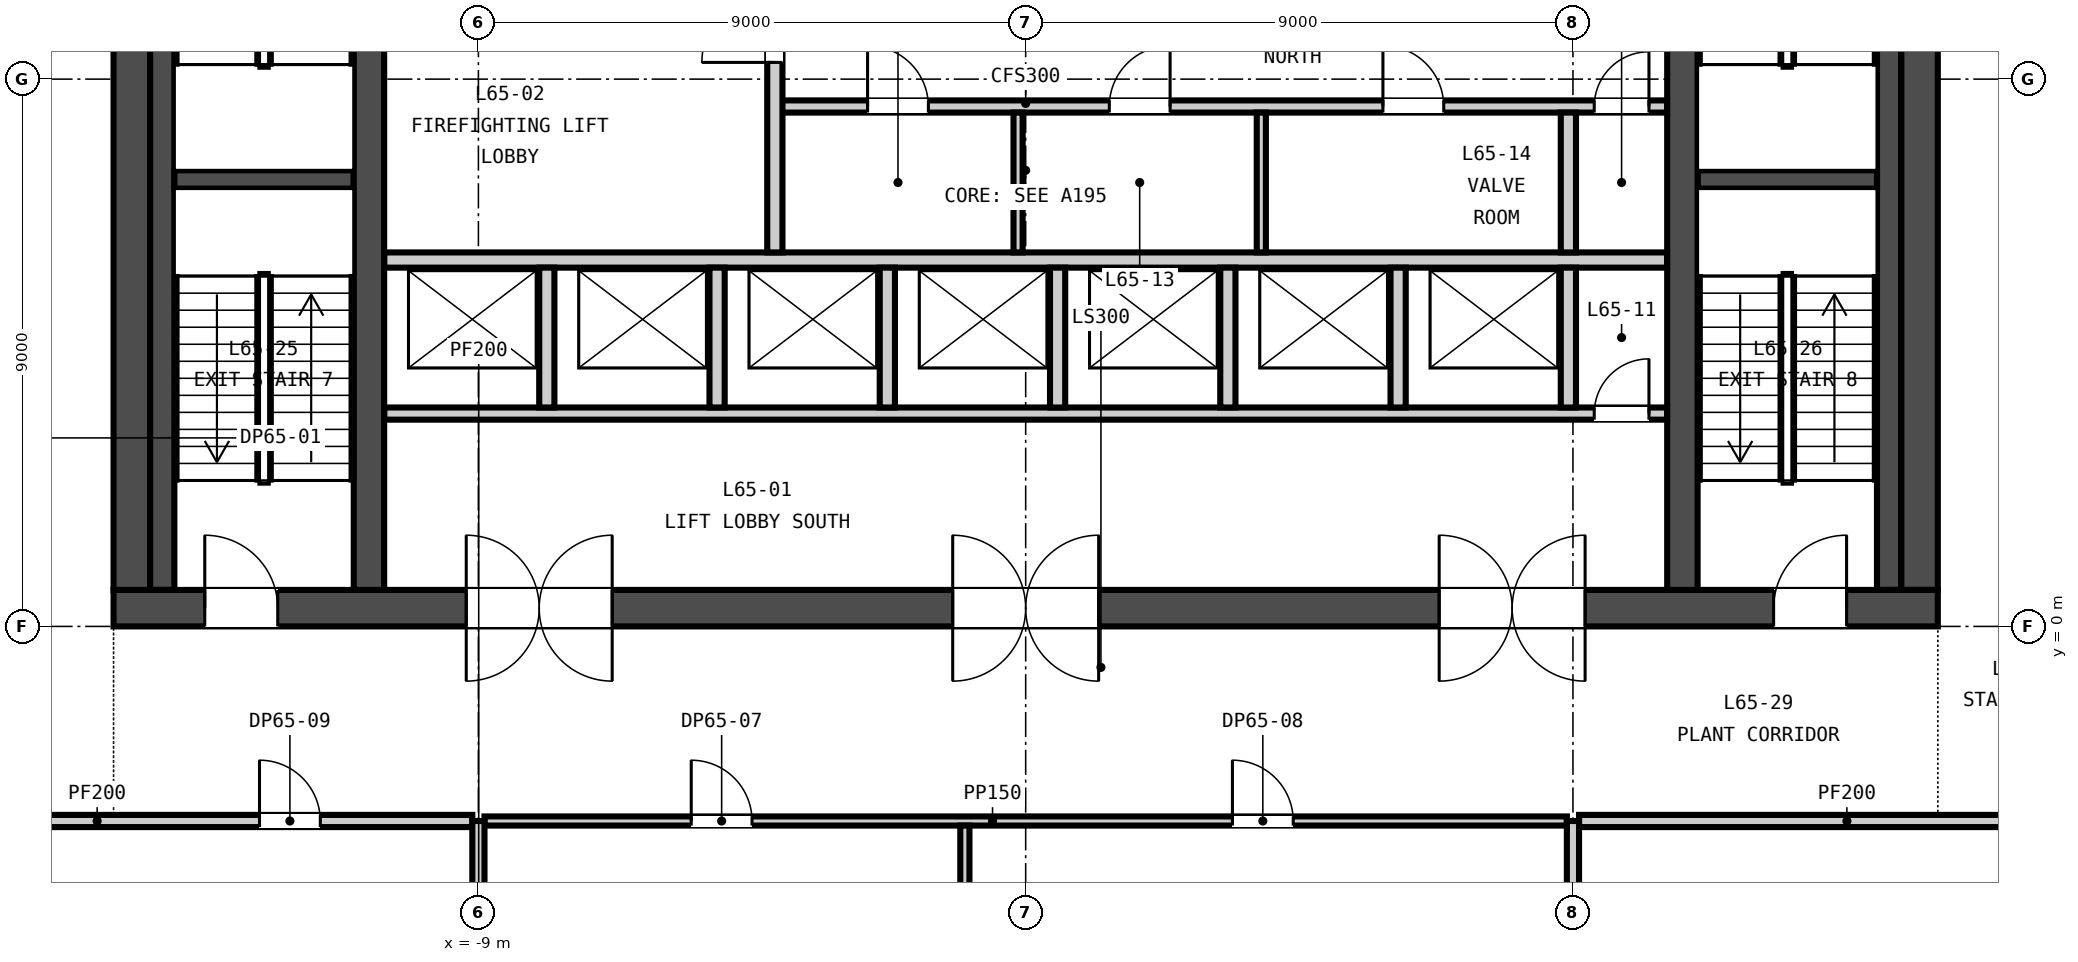
"""IFC4 building model, lengths in metres.
Left out: names, types, materials, properties, quantities, classifications, styles, units other than length and angle.
Written with IfcOpenShell. Run it as: python <this file> out.ifc"""

import sys

from ifc_helpers import new_model, si_unit, direction, frame, frame_2d, origin, place, context, subcontext, project, spatial, rectangle, extrude, element, fill, save


model = new_model("IFC4")
c1 = context("Model", 3, precision=1e-05, world=origin(), true_north=direction((0.0, 1.0)))
c2 = subcontext(c1, "Body", "Model", "MODEL_VIEW")
j1 = project(units=[si_unit("LENGTHUNIT", "METRE"), si_unit("PLANEANGLEUNIT", "RADIAN")], contexts=[c1])
p1 = place(None, origin())
s1 = spatial("IfcSite", under=j1, at=p1, CompositionType="ELEMENT")
p2 = place(p1, origin())
s2 = spatial("IfcBuilding", under=s1, at=p2, CompositionType="ELEMENT")
p3 = place(p2, frame((0.0, 0.0, 256.45)))
s3 = spatial("IfcBuildingStorey", under=s2, at=p3, CompositionType="ELEMENT", Elevation=256.45)
p4 = place(p3, frame((-15.0, 0.3, -0.3), z_axis=(0.0, 0.0, 1.0), x_axis=(1.0, 0.0, 0.0)))
e1 = element("IfcWall", 1, at=p4, inside=s3, PredefinedType="SOLIDWALL", context=c2, shape_type="SweptSolid", body=[
    extrude(rectangle(XDim=30.0, YDim=0.6, at=frame_2d((15.0, 0.0))), origin(), (0.0, 0.0, 1.0), 4.65),
])
p5 = place(p4, frame((5.8, 0.0, 0.3)))
e2 = element("IfcOpeningElement", 2, at=p5, cuts=e1, PredefinedType="OPENING", context=c2, shape_type="SweptSolid", body=[
    extrude(rectangle(XDim=2.4, YDim=2.4, at=frame_2d((1.2, 1.2))), frame((0.0, 0.31, 0.0), z_axis=(0.0, -1.0, 0.0), x_axis=(1.0, 0.0, 0.0)), (0.0, 0.0, 1.0), 0.62),
])
p6 = place(p4, frame((13.8, 0.0, 0.3)))
e3 = element("IfcOpeningElement", 3, at=p6, cuts=e1, PredefinedType="OPENING", context=c2, shape_type="SweptSolid", body=[
    extrude(rectangle(XDim=2.4, YDim=2.4, at=frame_2d((1.2, 1.2))), frame((0.0, 0.31, 0.0), z_axis=(0.0, -1.0, 0.0), x_axis=(1.0, 0.0, 0.0)), (0.0, 0.0, 1.0), 0.62),
])
p7 = place(p4, frame((21.8, 0.0, 0.3)))
e4 = element("IfcOpeningElement", 4, at=p7, cuts=e1, PredefinedType="OPENING", context=c2, shape_type="SweptSolid", body=[
    extrude(rectangle(XDim=2.4, YDim=2.4, at=frame_2d((1.2, 1.2))), frame((0.0, 0.31, 0.0), z_axis=(0.0, -1.0, 0.0), x_axis=(1.0, 0.0, 0.0)), (0.0, 0.0, 1.0), 0.62),
])
p8 = place(p4, frame((1.5, 0.0, 0.3)))
e5 = element("IfcOpeningElement", 5, at=p8, cuts=e1, PredefinedType="OPENING", context=c2, shape_type="SweptSolid", body=[
    extrude(rectangle(XDim=1.2, YDim=2.1, at=frame_2d((0.6, 1.05))), frame((0.0, 0.31, 0.0), z_axis=(0.0, -1.0, 0.0), x_axis=(1.0, 0.0, 0.0)), (0.0, 0.0, 1.0), 0.62),
])
p9 = place(p4, frame((27.3, 0.0, 0.3)))
e6 = element("IfcOpeningElement", 6, at=p9, cuts=e1, PredefinedType="OPENING", context=c2, shape_type="SweptSolid", body=[
    extrude(rectangle(XDim=1.2, YDim=2.1, at=frame_2d((0.6, 1.05))), frame((0.0, 0.31, 0.0), z_axis=(0.0, -1.0, 0.0), x_axis=(1.0, 0.0, 0.0)), (0.0, 0.0, 1.0), 0.62),
])
for number, where, z_axis, x_axis in (
    (7, (-14.7, 0.6, -0.3), (0.0, 0.0, 1.0), (0.0, 1.0, 0.0)),
    (8, (14.7, 0.6, -0.3), (0.0, 0.0, 1.0), (0.0, 1.0, 0.0)),
):
    element("IfcWall", number, at=place(p3, frame(where, z_axis=z_axis, x_axis=x_axis)), inside=s3, PredefinedType="SOLIDWALL", context=c2, shape_type="SweptSolid", body=[
        extrude(rectangle(XDim=13.8, YDim=0.6, at=frame_2d((6.9, 0.0))), origin(), (0.0, 0.0, 1.0), 4.65),
    ])
for number, where, z_axis, x_axis in (
    (9, (-10.8, 0.6, -0.3), (0.0, 0.0, 1.0), (0.0, 1.0, 0.0)),
    (10, (10.8, 0.6, -0.3), (0.0, 0.0, 1.0), (0.0, 1.0, 0.0)),
):
    element("IfcWall", number, at=place(p3, frame(where, z_axis=z_axis, x_axis=x_axis)), inside=s3, PredefinedType="SOLIDWALL", context=c2, shape_type="SweptSolid", body=[
        extrude(rectangle(XDim=13.8, YDim=0.5, at=frame_2d((6.9, 0.0))), origin(), (0.0, 0.0, 1.0), 4.65),
    ])
p10 = place(p3, frame((-10.55, 3.5, 0.0), z_axis=(0.0, 0.0, 1.0), x_axis=(1.0, 0.0, 0.0)))
e11 = element("IfcWall", 11, at=p10, inside=s3, PredefinedType="PARTITIONING", context=c2, shape_type="SweptSolid", body=[
    extrude(rectangle(XDim=21.1, YDim=0.2, at=frame_2d((10.55, 0.0))), origin(), (0.0, 0.0, 1.0), 4.35),
])
p11 = place(p10, frame((19.9, 0.0, 0.0)))
e12 = element("IfcOpeningElement", 12, at=p11, cuts=e11, PredefinedType="OPENING", context=c2, shape_type="SweptSolid", body=[
    extrude(rectangle(XDim=0.9, YDim=2.1, at=frame_2d((0.45, 1.05))), frame((0.0, 0.11, 0.0), z_axis=(0.0, -1.0, 0.0), x_axis=(1.0, 0.0, 0.0)), (0.0, 0.0, 1.0), 0.22),
])
p12 = place(p3, frame((-10.55, 6.025, 0.0), z_axis=(0.0, 0.0, 1.0), x_axis=(1.0, 0.0, 0.0)))
e13 = element("IfcWall", 13, at=p12, inside=s3, PredefinedType="PARTITIONING", context=c2, shape_type="SweptSolid", body=[
    extrude(rectangle(XDim=21.1, YDim=0.25, at=frame_2d((10.55, 0.0))), origin(), (0.0, 0.0, 1.0), 4.35),
])
p13 = place(p3, frame((-4.125, 8.55, 0.0), z_axis=(0.0, 0.0, 1.0), x_axis=(1.0, 0.0, 0.0)))
e14 = element("IfcWall", 14, at=p13, inside=s3, PredefinedType="PARTITIONING", context=c2, shape_type="SweptSolid", body=[
    extrude(rectangle(XDim=14.675, YDim=0.2, at=frame_2d((7.337, 0.0))), origin(), (0.0, 0.0, 1.0), 4.35),
])
p14 = place(p13, frame((1.525, 0.0, 0.0)))
e15 = element("IfcOpeningElement", 15, at=p14, cuts=e14, PredefinedType="OPENING", context=c2, shape_type="SweptSolid", body=[
    extrude(rectangle(XDim=1.0, YDim=2.1, at=frame_2d((0.5, 1.05))), frame((0.0, 0.11, 0.0), z_axis=(0.0, -1.0, 0.0), x_axis=(1.0, 0.0, 0.0)), (0.0, 0.0, 1.0), 0.22),
])
p15 = place(p13, frame((5.5, 0.0, 0.0)))
e16 = element("IfcOpeningElement", 16, at=p15, cuts=e14, PredefinedType="OPENING", context=c2, shape_type="SweptSolid", body=[
    extrude(rectangle(XDim=1.0, YDim=2.1, at=frame_2d((0.5, 1.05))), frame((0.0, 0.11, 0.0), z_axis=(0.0, -1.0, 0.0), x_axis=(1.0, 0.0, 0.0)), (0.0, 0.0, 1.0), 0.22),
])
p16 = place(p13, frame((10.0, 0.0, 0.0)))
e17 = element("IfcOpeningElement", 17, at=p16, cuts=e14, PredefinedType="OPENING", context=c2, shape_type="SweptSolid", body=[
    extrude(rectangle(XDim=1.0, YDim=2.1, at=frame_2d((0.5, 1.05))), frame((0.0, 0.11, 0.0), z_axis=(0.0, -1.0, 0.0), x_axis=(1.0, 0.0, 0.0)), (0.0, 0.0, 1.0), 0.22),
])
p17 = place(p13, frame((13.475, 0.0, 0.0)))
e18 = element("IfcOpeningElement", 18, at=p17, cuts=e14, PredefinedType="OPENING", context=c2, shape_type="SweptSolid", body=[
    extrude(rectangle(XDim=0.9, YDim=2.1, at=frame_2d((0.45, 1.05))), frame((0.0, 0.11, 0.0), z_axis=(0.0, -1.0, 0.0), x_axis=(1.0, 0.0, 0.0)), (0.0, 0.0, 1.0), 0.22),
])
p18 = place(p3, frame((-4.125, 6.15, 0.0), z_axis=(0.0, 0.0, 1.0), x_axis=(0.0, 1.0, 0.0)))
e19 = element("IfcWall", 19, at=p18, inside=s3, PredefinedType="PARTITIONING", context=c2, shape_type="SweptSolid", body=[
    extrude(rectangle(XDim=4.95, YDim=0.25, at=frame_2d((2.475, 0.0))), origin(), (0.0, 0.0, 1.0), 4.35),
])
p19 = place(p18, frame((3.125, 0.0, 0.0)))
e20 = element("IfcOpeningElement", 20, at=p19, cuts=e19, PredefinedType="OPENING", context=c2, shape_type="SweptSolid", body=[
    extrude(rectangle(XDim=1.2, YDim=2.1, at=frame_2d((0.6, 1.05))), frame((0.0, 0.135, 0.0), z_axis=(0.0, -1.0, 0.0), x_axis=(1.0, 0.0, 0.0)), (0.0, 0.0, 1.0), 0.27),
])
for number, where, z_axis, x_axis in (
    (21, (-7.875, 3.6, 0.0), (0.0, 0.0, 1.0), (0.0, 1.0, 0.0)),
    (22, (-5.075, 3.6, 0.0), (0.0, 0.0, 1.0), (0.0, 1.0, 0.0)),
    (23, (-2.275, 3.6, 0.0), (0.0, 0.0, 1.0), (0.0, 1.0, 0.0)),
    (24, (0.525, 3.6, 0.0), (0.0, 0.0, 1.0), (0.0, 1.0, 0.0)),
    (25, (3.325, 3.6, 0.0), (0.0, 0.0, 1.0), (0.0, 1.0, 0.0)),
    (26, (6.125, 3.6, 0.0), (0.0, 0.0, 1.0), (0.0, 1.0, 0.0)),
    (27, (8.925, 3.6, 0.0), (0.0, 0.0, 1.0), (0.0, 1.0, 0.0)),
):
    element("IfcWall", number, at=place(p3, frame(where, z_axis=z_axis, x_axis=x_axis)), inside=s3, PredefinedType="PARTITIONING", context=c2, shape_type="SweptSolid", body=[
        extrude(rectangle(XDim=2.3, YDim=0.25, at=frame_2d((1.15, 0.0))), origin(), (0.0, 0.0, 1.0), 4.35),
    ])
for number, where, z_axis, x_axis in (
    (28, (-0.125, 6.15, 0.0), (0.0, 0.0, 1.0), (0.0, 1.0, 0.0)),
    (29, (3.875, 6.15, 0.0), (0.0, 0.0, 1.0), (0.0, 1.0, 0.0)),
):
    element("IfcWall", number, at=place(p3, frame(where, z_axis=z_axis, x_axis=x_axis)), inside=s3, PredefinedType="PARTITIONING", context=c2, shape_type="SweptSolid", body=[
        extrude(rectangle(XDim=2.3, YDim=0.15, at=frame_2d((1.15, 0.0))), origin(), (0.0, 0.0, 1.0), 4.35),
    ])
p20 = place(p3, frame((8.925, 6.15, 0.0), z_axis=(0.0, 0.0, 1.0), x_axis=(0.0, 1.0, 0.0)))
e30 = element("IfcWall", 30, at=p20, inside=s3, PredefinedType="PARTITIONING", context=c2, shape_type="SweptSolid", body=[
    extrude(rectangle(XDim=2.3, YDim=0.25, at=frame_2d((1.15, 0.0))), origin(), (0.0, 0.0, 1.0), 4.35),
])
p21 = place(p3, frame((-14.0, 7.35, 0.0), z_axis=(0.0, 0.0, 1.0), x_axis=(1.0, 0.0, 0.0)))
e31 = element("IfcWall", 31, at=p21, inside=s3, PredefinedType="SOLIDWALL", context=c2, shape_type="SweptSolid", body=[
    extrude(rectangle(XDim=2.95, YDim=0.3, at=frame_2d((1.475, 0.0))), origin(), (0.0, 0.0, 1.0), 4.35),
])
p22 = place(p3, frame((-14.2, 0.6, 0.0), z_axis=(0.0, 0.0, 1.0), x_axis=(0.0, 1.0, 0.0)))
e32 = element("IfcWall", 32, at=p22, inside=s3, PredefinedType="SOLIDWALL", context=c2, shape_type="SweptSolid", body=[
    extrude(rectangle(XDim=13.8, YDim=0.4, at=frame_2d((6.9, 0.0))), origin(), (0.0, 0.0, 1.0), 4.35),
])
p23 = place(p3, frame((11.05, 7.35, 0.0), z_axis=(0.0, 0.0, 1.0), x_axis=(1.0, 0.0, 0.0)))
e33 = element("IfcWall", 33, at=p23, inside=s3, PredefinedType="SOLIDWALL", context=c2, shape_type="SweptSolid", body=[
    extrude(rectangle(XDim=2.95, YDim=0.3, at=frame_2d((1.475, 0.0))), origin(), (0.0, 0.0, 1.0), 4.35),
])
p24 = place(p3, frame((14.2, 0.6, 0.0), z_axis=(0.0, 0.0, 1.0), x_axis=(0.0, 1.0, 0.0)))
e34 = element("IfcWall", 34, at=p24, inside=s3, PredefinedType="SOLIDWALL", context=c2, shape_type="SweptSolid", body=[
    extrude(rectangle(XDim=13.8, YDim=0.4, at=frame_2d((6.9, 0.0))), origin(), (0.0, 0.0, 1.0), 4.35),
])
p25 = place(p3, frame((-17.9, -3.2, 0.0), z_axis=(0.0, 0.0, 1.0), x_axis=(1.0, 0.0, 0.0)))
e35 = element("IfcWall", 35, at=p25, inside=s3, PredefinedType="PARTITIONING", context=c2, shape_type="SweptSolid", body=[
    extrude(rectangle(XDim=8.8, YDim=0.2, at=frame_2d((4.4, 0.0))), origin(), (0.0, 0.0, 1.0), 4.35),
])
p26 = place(p25, frame((5.3, 0.0, 0.0)))
e36 = element("IfcOpeningElement", 36, at=p26, cuts=e35, PredefinedType="OPENING", context=c2, shape_type="SweptSolid", body=[
    extrude(rectangle(XDim=1.0, YDim=2.1, at=frame_2d((0.5, 1.05))), frame((0.0, 0.11, 0.0), z_axis=(0.0, -1.0, 0.0), x_axis=(1.0, 0.0, 0.0)), (0.0, 0.0, 1.0), 0.22),
])
p27 = place(p3, frame((-8.9, -3.2, 0.0), z_axis=(0.0, 0.0, 1.0), x_axis=(1.0, 0.0, 0.0)))
e37 = element("IfcWall", 37, at=p27, inside=s3, PredefinedType="PARTITIONING", context=c2, shape_type="SweptSolid", body=[
    extrude(rectangle(XDim=17.8, YDim=0.15, at=frame_2d((8.9, 0.0))), origin(), (0.0, 0.0, 1.0), 4.35),
])
p28 = place(p27, frame((3.4, 0.0, 0.0)))
e38 = element("IfcOpeningElement", 38, at=p28, cuts=e37, PredefinedType="OPENING", context=c2, shape_type="SweptSolid", body=[
    extrude(rectangle(XDim=1.0, YDim=2.1, at=frame_2d((0.5, 1.05))), frame((0.0, 0.085, 0.0), z_axis=(0.0, -1.0, 0.0), x_axis=(1.0, 0.0, 0.0)), (0.0, 0.0, 1.0), 0.17),
])
p29 = place(p27, frame((12.3, 0.0, 0.0)))
e39 = element("IfcOpeningElement", 39, at=p29, cuts=e37, PredefinedType="OPENING", context=c2, shape_type="SweptSolid", body=[
    extrude(rectangle(XDim=1.0, YDim=2.1, at=frame_2d((0.5, 1.05))), frame((0.0, 0.085, 0.0), z_axis=(0.0, -1.0, 0.0), x_axis=(1.0, 0.0, 0.0)), (0.0, 0.0, 1.0), 0.17),
])
p30 = place(p3, frame((9.1, -3.2, 0.0), z_axis=(0.0, 0.0, 1.0), x_axis=(1.0, 0.0, 0.0)))
e40 = element("IfcWall", 40, at=p30, inside=s3, PredefinedType="PARTITIONING", context=c2, shape_type="SweptSolid", body=[
    extrude(rectangle(XDim=8.8, YDim=0.2, at=frame_2d((4.4, 0.0))), origin(), (0.0, 0.0, 1.0), 4.35),
])
p31 = place(p3, frame((-9.0, -9.0, 0.0), z_axis=(0.0, 0.0, 1.0), x_axis=(0.0, 1.0, 0.0)))
e41 = element("IfcWall", 41, at=p31, inside=s3, PredefinedType="PARTITIONING", context=c2, shape_type="SweptSolid", body=[
    extrude(rectangle(XDim=5.8, YDim=0.2, at=frame_2d((2.9, 0.0))), origin(), (0.0, 0.0, 1.0), 4.35),
])
p32 = place(p3, frame((-1.0, -9.0, 0.0), z_axis=(0.0, 0.0, 1.0), x_axis=(0.0, 1.0, 0.0)))
e42 = element("IfcWall", 42, at=p32, inside=s3, PredefinedType="PARTITIONING", context=c2, shape_type="SweptSolid", body=[
    extrude(rectangle(XDim=5.725, YDim=0.15, at=frame_2d((2.863, 0.0))), origin(), (0.0, 0.0, 1.0), 4.35),
])
p33 = place(p3, frame((9.0, -9.0, 0.0), z_axis=(0.0, 0.0, 1.0), x_axis=(0.0, 1.0, 0.0)))
e43 = element("IfcWall", 43, at=p33, inside=s3, PredefinedType="PARTITIONING", context=c2, shape_type="SweptSolid", body=[
    extrude(rectangle(XDim=5.8, YDim=0.2, at=frame_2d((2.9, 0.0))), origin(), (0.0, 0.0, 1.0), 4.35),
])
p34 = place(p3, frame((10.326, 20.968, 0.0), z_axis=(0.0, 0.0, 1.0), x_axis=(0.669133107761, -0.743142573197, 0.0)))
e44 = element("IfcWall", 44, at=p34, inside=s3, PredefinedType="PARTITIONING", context=c2, shape_type="SweptSolid", body=[
    extrude(rectangle(XDim=24.431, YDim=0.2, at=frame_2d((12.215, 0.0))), origin(), (0.0, 0.0, 1.0), 4.35),
])
p35 = place(p3, frame((26.76, 1.849, 0.0), z_axis=(0.0, 0.0, 1.0), x_axis=(-0.499999183719, -0.866025875064, 0.0)))
e45 = element("IfcWall", 45, at=p35, inside=s3, PredefinedType="PARTITIONING", context=c2, shape_type="SweptSolid", body=[
    extrude(rectangle(XDim=22.223, YDim=0.2, at=frame_2d((11.112, 0.0))), origin(), (0.0, 0.0, 1.0), 4.35),
])
p36 = place(p3, frame((-23.322, -1.542, 0.0), z_axis=(0.0, 0.0, 1.0), x_axis=(0.30902054225, 0.951055363513, 0.0)))
e46 = element("IfcWall", 46, at=p36, inside=s3, PredefinedType="PARTITIONING", context=c2, shape_type="SweptSolid", body=[
    extrude(rectangle(XDim=24.431, YDim=0.2, at=frame_2d((12.215, 0.0))), origin(), (0.0, 0.0, 1.0), 4.35),
])
p37 = place(p19, origin())
e47 = element("IfcDoor", 47, at=p37, inside=s3, OperationType="SINGLE_SWING_LEFT", PredefinedType="DOOR", context=c2, shape_type="SweptSolid", body=[
    extrude(rectangle(XDim=1.2, YDim=2.1, at=frame_2d((0.6, 1.05))), frame((0.0, 0.025, 0.0), z_axis=(0.0, -1.0, 0.0), x_axis=(1.0, 0.0, 0.0)), (0.0, 0.0, 1.0), 0.05),
])
fill(e20, e47)
p38 = place(p11, origin())
e48 = element("IfcDoor", 48, at=p38, inside=s3, OperationType="SINGLE_SWING_RIGHT", PredefinedType="DOOR", context=c2, shape_type="SweptSolid", body=[
    extrude(rectangle(XDim=0.9, YDim=2.1, at=frame_2d((0.45, 1.05))), frame((0.0, 0.025, 0.0), z_axis=(0.0, -1.0, 0.0), x_axis=(1.0, 0.0, 0.0)), (0.0, 0.0, 1.0), 0.05),
])
fill(e12, e48)
p39 = place(p14, origin())
e49 = element("IfcDoor", 49, at=p39, inside=s3, OperationType="SINGLE_SWING_LEFT", PredefinedType="DOOR", context=c2, shape_type="SweptSolid", body=[
    extrude(rectangle(XDim=1.0, YDim=2.1, at=frame_2d((0.5, 1.05))), frame((0.0, 0.025, 0.0), z_axis=(0.0, -1.0, 0.0), x_axis=(1.0, 0.0, 0.0)), (0.0, 0.0, 1.0), 0.05),
])
fill(e15, e49)
p40 = place(p15, origin())
e50 = element("IfcDoor", 50, at=p40, inside=s3, OperationType="SINGLE_SWING_RIGHT", PredefinedType="DOOR", context=c2, shape_type="SweptSolid", body=[
    extrude(rectangle(XDim=1.0, YDim=2.1, at=frame_2d((0.5, 1.05))), frame((0.0, 0.025, 0.0), z_axis=(0.0, -1.0, 0.0), x_axis=(1.0, 0.0, 0.0)), (0.0, 0.0, 1.0), 0.05),
])
fill(e16, e50)
p41 = place(p16, origin())
e51 = element("IfcDoor", 51, at=p41, inside=s3, OperationType="SINGLE_SWING_LEFT", PredefinedType="DOOR", context=c2, shape_type="SweptSolid", body=[
    extrude(rectangle(XDim=1.0, YDim=2.1, at=frame_2d((0.5, 1.05))), frame((0.0, 0.025, 0.0), z_axis=(0.0, -1.0, 0.0), x_axis=(1.0, 0.0, 0.0)), (0.0, 0.0, 1.0), 0.05),
])
fill(e17, e51)
p42 = place(p17, origin())
e52 = element("IfcDoor", 52, at=p42, inside=s3, OperationType="SINGLE_SWING_RIGHT", PredefinedType="DOOR", context=c2, shape_type="SweptSolid", body=[
    extrude(rectangle(XDim=0.9, YDim=2.1, at=frame_2d((0.45, 1.05))), frame((0.0, 0.025, 0.0), z_axis=(0.0, -1.0, 0.0), x_axis=(1.0, 0.0, 0.0)), (0.0, 0.0, 1.0), 0.05),
])
fill(e18, e52)
p43 = place(p5, origin())
e53 = element("IfcDoor", 53, at=p43, inside=s3, OperationType="DOUBLE_DOOR_DOUBLE_SWING", PredefinedType="DOOR", context=c2, shape_type="SweptSolid", body=[
    extrude(rectangle(XDim=2.4, YDim=2.4, at=frame_2d((1.2, 1.2))), frame((0.0, 0.025, 0.0), z_axis=(0.0, -1.0, 0.0), x_axis=(1.0, 0.0, 0.0)), (0.0, 0.0, 1.0), 0.05),
])
fill(e2, e53)
p44 = place(p6, origin())
e54 = element("IfcDoor", 54, at=p44, inside=s3, OperationType="DOUBLE_DOOR_DOUBLE_SWING", PredefinedType="DOOR", context=c2, shape_type="SweptSolid", body=[
    extrude(rectangle(XDim=2.4, YDim=2.4, at=frame_2d((1.2, 1.2))), frame((0.0, 0.025, 0.0), z_axis=(0.0, -1.0, 0.0), x_axis=(1.0, 0.0, 0.0)), (0.0, 0.0, 1.0), 0.05),
])
fill(e3, e54)
p45 = place(p7, origin())
e55 = element("IfcDoor", 55, at=p45, inside=s3, OperationType="DOUBLE_DOOR_DOUBLE_SWING", PredefinedType="DOOR", context=c2, shape_type="SweptSolid", body=[
    extrude(rectangle(XDim=2.4, YDim=2.4, at=frame_2d((1.2, 1.2))), frame((0.0, 0.025, 0.0), z_axis=(0.0, -1.0, 0.0), x_axis=(1.0, 0.0, 0.0)), (0.0, 0.0, 1.0), 0.05),
])
fill(e4, e55)
p46 = place(p8, origin())
e56 = element("IfcDoor", 56, at=p46, inside=s3, OperationType="SINGLE_SWING_LEFT", PredefinedType="DOOR", context=c2, shape_type="SweptSolid", body=[
    extrude(rectangle(XDim=1.2, YDim=2.1, at=frame_2d((0.6, 1.05))), frame((0.0, 0.025, 0.0), z_axis=(0.0, -1.0, 0.0), x_axis=(1.0, 0.0, 0.0)), (0.0, 0.0, 1.0), 0.05),
])
fill(e5, e56)
p47 = place(p9, origin())
e57 = element("IfcDoor", 57, at=p47, inside=s3, OperationType="SINGLE_SWING_RIGHT", PredefinedType="DOOR", context=c2, shape_type="SweptSolid", body=[
    extrude(rectangle(XDim=1.2, YDim=2.1, at=frame_2d((0.6, 1.05))), frame((0.0, 0.025, 0.0), z_axis=(0.0, -1.0, 0.0), x_axis=(1.0, 0.0, 0.0)), (0.0, 0.0, 1.0), 0.05),
])
fill(e6, e57)
p48 = place(p28, origin())
e58 = element("IfcDoor", 58, at=p48, inside=s3, OperationType="SINGLE_SWING_LEFT", PredefinedType="DOOR", context=c2, shape_type="SweptSolid", body=[
    extrude(rectangle(XDim=1.0, YDim=2.1, at=frame_2d((0.5, 1.05))), frame((0.0, 0.025, 0.0), z_axis=(0.0, -1.0, 0.0), x_axis=(1.0, 0.0, 0.0)), (0.0, 0.0, 1.0), 0.05),
])
fill(e38, e58)
p49 = place(p29, origin())
e59 = element("IfcDoor", 59, at=p49, inside=s3, OperationType="SINGLE_SWING_LEFT", PredefinedType="DOOR", context=c2, shape_type="SweptSolid", body=[
    extrude(rectangle(XDim=1.0, YDim=2.1, at=frame_2d((0.5, 1.05))), frame((0.0, 0.025, 0.0), z_axis=(0.0, -1.0, 0.0), x_axis=(1.0, 0.0, 0.0)), (0.0, 0.0, 1.0), 0.05),
])
fill(e39, e59)
p50 = place(p26, origin())
e60 = element("IfcDoor", 60, at=p50, inside=s3, OperationType="SINGLE_SWING_LEFT", PredefinedType="DOOR", context=c2, shape_type="SweptSolid", body=[
    extrude(rectangle(XDim=1.0, YDim=2.1, at=frame_2d((0.5, 1.05))), frame((0.0, 0.025, 0.0), z_axis=(0.0, -1.0, 0.0), x_axis=(1.0, 0.0, 0.0)), (0.0, 0.0, 1.0), 0.05),
])
fill(e36, e60)
save(model, sys.argv[1])
